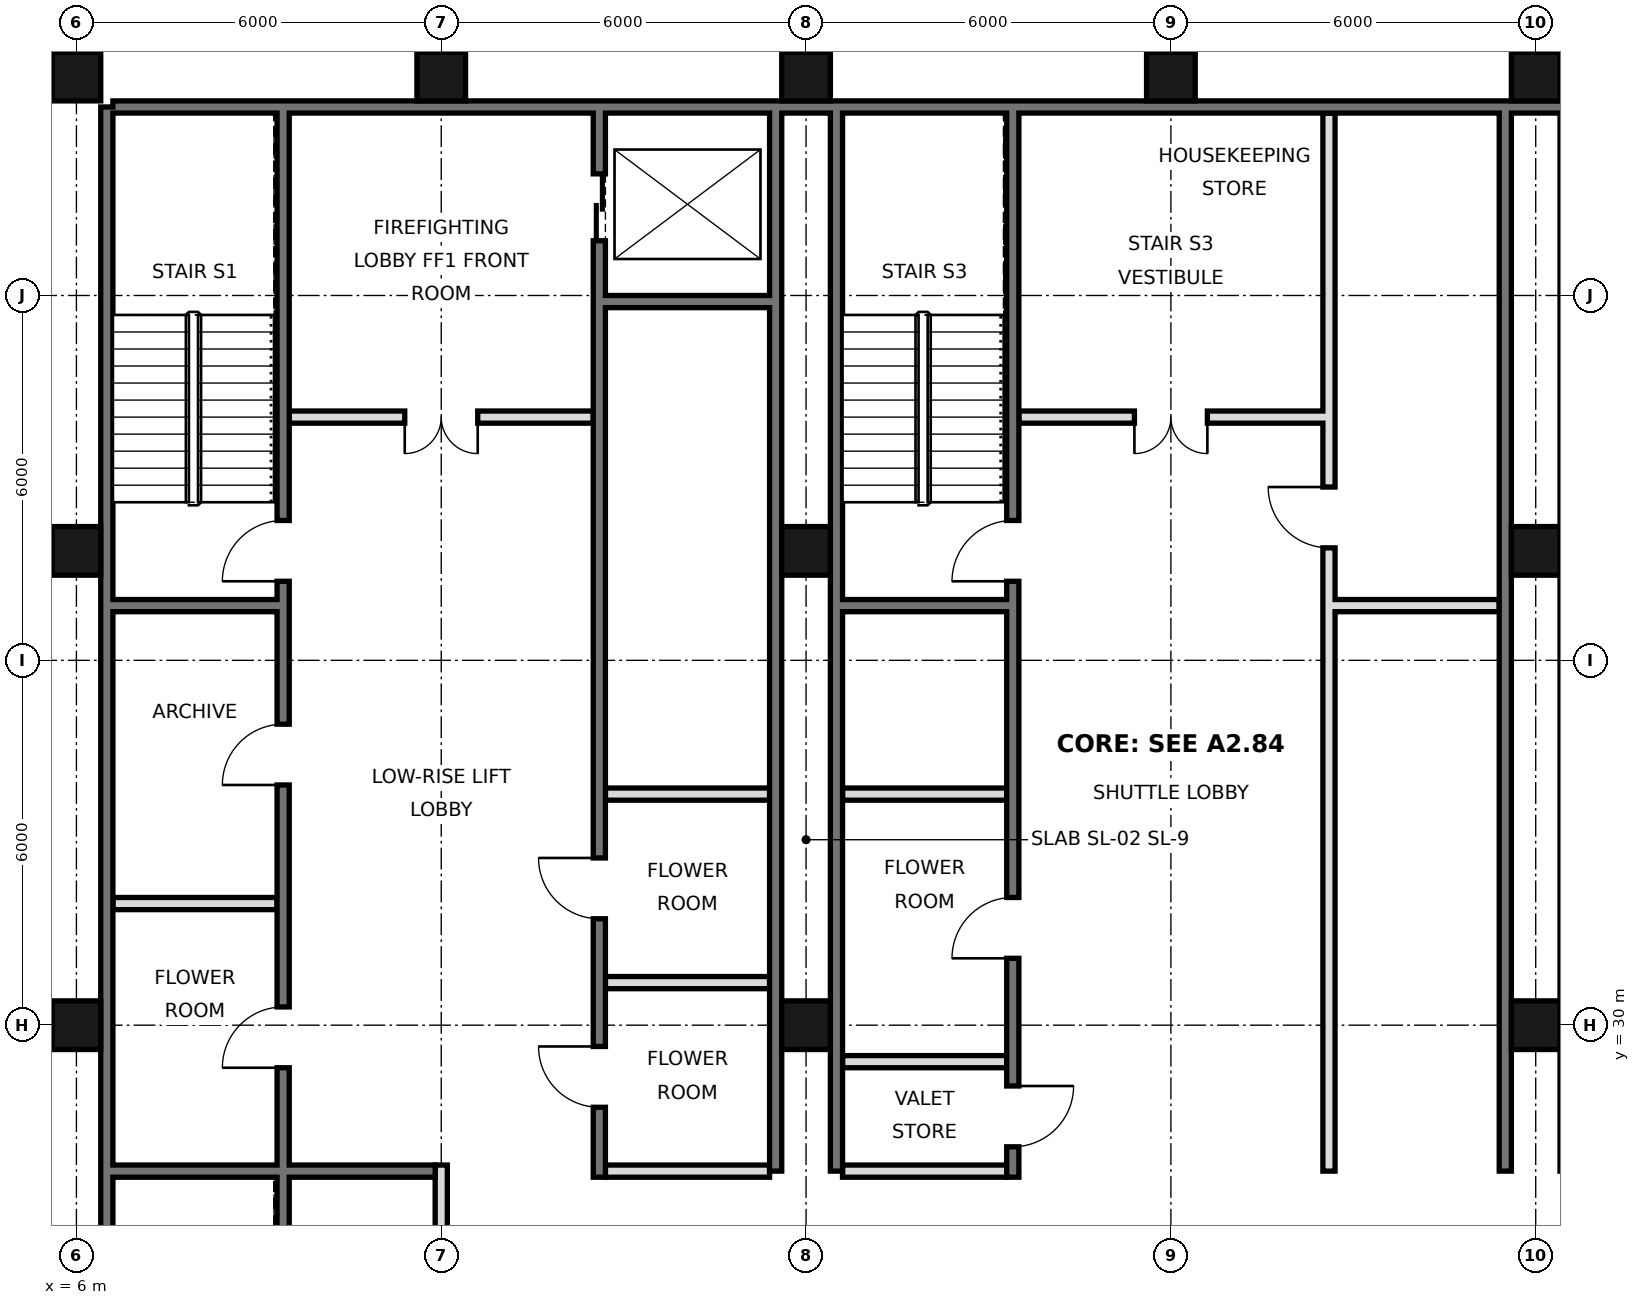
"""IFC4 building model, lengths in metres.
Left out: names, types, materials, properties, quantities, classifications, styles, units other than length and angle.
Written with IfcOpenShell. Run it as: python <this file> out.ifc"""

import sys

from ifc_helpers import new_model, si_unit, direction, frame, frame_2d, origin, origin_2d, place, context, subcontext, project, spatial, rectangle, hollow_rectangle, extrude, element, fill, save


model = new_model("IFC4")
c1 = context("Model", 3, precision=1e-05, world=origin(), true_north=direction((0.0, 1.0)))
c2 = subcontext(c1, "Body", "Model", "MODEL_VIEW")
j1 = project(units=[si_unit("LENGTHUNIT", "METRE"), si_unit("PLANEANGLEUNIT", "RADIAN")], contexts=[c1])
p1 = place(None, origin())
s1 = spatial("IfcSite", under=j1, at=p1, CompositionType="ELEMENT")
p2 = place(p1, origin())
s2 = spatial("IfcBuilding", under=s1, at=p2, CompositionType="ELEMENT")
p3 = place(p2, frame((0.0, 0.0, 337.8)))
s3 = spatial("IfcBuildingStorey", under=s2, at=p3, CompositionType="ELEMENT", Elevation=337.8)
for number, where, z_axis, x_axis in (
    (1, (6.0, 30.0, 0.0), (0.0, 0.0, 1.0), (1.0, 0.0, 0.0)),
    (2, (6.0, 37.8, 0.0), (0.0, 0.0, 1.0), (1.0, 0.0, 0.0)),
    (3, (6.0, 45.6, 0.0), (0.0, 0.0, 1.0), (1.0, 0.0, 0.0)),
    (4, (12.0, 45.6, 0.0), (0.0, 0.0, 1.0), (1.0, 0.0, 0.0)),
    (5, (18.0, 30.0, 0.0), (0.0, 0.0, 1.0), (1.0, 0.0, 0.0)),
    (6, (18.0, 37.8, 0.0), (0.0, 0.0, 1.0), (1.0, 0.0, 0.0)),
    (7, (18.0, 45.6, 0.0), (0.0, 0.0, 1.0), (1.0, 0.0, 0.0)),
    (8, (24.0, 45.6, 0.0), (0.0, 0.0, 1.0), (1.0, 0.0, 0.0)),
    (9, (30.0, 30.0, 0.0), (0.0, 0.0, 1.0), (1.0, 0.0, 0.0)),
    (10, (30.0, 37.8, 0.0), (0.0, 0.0, 1.0), (1.0, 0.0, 0.0)),
    (11, (30.0, 45.6, 0.0), (0.0, 0.0, 1.0), (1.0, 0.0, 0.0)),
):
    element("IfcColumn", number, at=place(p3, frame(where, z_axis=z_axis, x_axis=x_axis)), inside=s3, PredefinedType="COLUMN", context=c2, shape_type="SweptSolid", body=[
        extrude(hollow_rectangle(XDim=0.8, YDim=0.8, WallThickness=0.025, at=origin_2d()), origin(), (0.0, 0.0, 1.0), 4.0),
    ])
p4 = place(p3, frame((6.5, 21.6, 0.0), z_axis=(0.0, 0.0, 1.0), x_axis=(0.0, 1.0, 0.0)))
e12 = element("IfcWall", 12, at=p4, inside=s3, PredefinedType="SOLIDWALL", context=c2, shape_type="SweptSolid", body=[
    extrude(rectangle(XDim=23.5, YDim=0.2, at=frame_2d((11.75, 0.0))), origin(), (0.0, 0.0, 1.0), 3.75),
])
p5 = place(p3, frame((6.6, 45.1, 0.0), z_axis=(0.0, 0.0, 1.0), x_axis=(1.0, 0.0, 0.0)))
e13 = element("IfcWall", 13, at=p5, inside=s3, PredefinedType="SOLIDWALL", context=c2, shape_type="SweptSolid", body=[
    extrude(rectangle(XDim=34.8, YDim=0.2, at=frame_2d((17.4, 0.0))), origin(), (0.0, 0.0, 1.0), 3.75),
])
for number, where, z_axis, x_axis in (
    (14, (17.5, 27.6, 0.0), (0.0, 0.0, 1.0), (0.0, 1.0, 0.0)),
    (15, (18.5, 27.6, 0.0), (0.0, 0.0, 1.0), (0.0, 1.0, 0.0)),
    (16, (29.5, 27.6, 0.0), (0.0, 0.0, 1.0), (0.0, 1.0, 0.0)),
):
    element("IfcWall", number, at=place(p3, frame(where, z_axis=z_axis, x_axis=x_axis)), inside=s3, PredefinedType="SOLIDWALL", context=c2, shape_type="SweptSolid", body=[
        extrude(rectangle(XDim=17.5, YDim=0.2, at=frame_2d((8.75, 0.0))), origin(), (0.0, 0.0, 1.0), 3.75),
    ])
p6 = place(p3, frame((12.0, 21.6, 0.0), z_axis=(0.0, 0.0, 1.0), x_axis=(0.0, 1.0, 0.0)))
e17 = element("IfcWall", 17, at=p6, inside=s3, PredefinedType="PARTITIONING", context=c2, shape_type="SweptSolid", body=[
    extrude(rectangle(XDim=6.1, YDim=0.2, at=frame_2d((3.05, 0.0))), origin(), (0.0, 0.0, 1.0), 3.75),
])
p7 = place(p3, frame((14.6, 27.5, 0.0), z_axis=(0.0, 0.0, 1.0), x_axis=(0.0, 1.0, 0.0)))
e18 = element("IfcWall", 18, at=p7, inside=s3, PredefinedType="SOLIDWALL", context=c2, shape_type="SweptSolid", body=[
    extrude(rectangle(XDim=17.5, YDim=0.2, at=frame_2d((8.75, 0.0))), origin(), (0.0, 0.0, 1.0), 3.75),
])
p8 = place(p7, frame((15.4, 0.0, 0.0)))
e19 = element("IfcOpeningElement", 19, at=p8, cuts=e18, PredefinedType="OPENING", context=c2, shape_type="SweptSolid", body=[
    extrude(rectangle(XDim=1.1, YDim=2.1, at=frame_2d((0.55, 1.05))), frame((0.0, 0.11, 0.0), z_axis=(0.0, -1.0, 0.0), x_axis=(1.0, 0.0, 0.0)), (0.0, 0.0, 1.0), 0.22),
])
p9 = place(p7, frame((1.15, 0.0, 0.0)))
e20 = element("IfcOpeningElement", 20, at=p9, cuts=e18, PredefinedType="OPENING", context=c2, shape_type="SweptSolid", body=[
    extrude(rectangle(XDim=1.0, YDim=2.1, at=frame_2d((0.5, 1.05))), frame((0.0, 0.11, 0.0), z_axis=(0.0, -1.0, 0.0), x_axis=(1.0, 0.0, 0.0)), (0.0, 0.0, 1.0), 0.22),
])
p10 = place(p7, frame((4.25, 0.0, 0.0)))
e21 = element("IfcOpeningElement", 21, at=p10, cuts=e18, PredefinedType="OPENING", context=c2, shape_type="SweptSolid", body=[
    extrude(rectangle(XDim=1.0, YDim=2.1, at=frame_2d((0.5, 1.05))), frame((0.0, 0.11, 0.0), z_axis=(0.0, -1.0, 0.0), x_axis=(1.0, 0.0, 0.0)), (0.0, 0.0, 1.0), 0.22),
])
p11 = place(p3, frame((21.4, 27.5, 0.0), z_axis=(0.0, 0.0, 1.0), x_axis=(0.0, 1.0, 0.0)))
e22 = element("IfcWall", 22, at=p11, inside=s3, PredefinedType="SOLIDWALL", context=c2, shape_type="SweptSolid", body=[
    extrude(rectangle(XDim=17.5, YDim=0.2, at=frame_2d((8.75, 0.0))), origin(), (0.0, 0.0, 1.0), 3.75),
])
p12 = place(p11, frame((0.5, 0.0, 0.0)))
e23 = element("IfcOpeningElement", 23, at=p12, cuts=e22, PredefinedType="OPENING", context=c2, shape_type="SweptSolid", body=[
    extrude(rectangle(XDim=1.0, YDim=2.1, at=frame_2d((0.5, 1.05))), frame((0.0, 0.11, 0.0), z_axis=(0.0, -1.0, 0.0), x_axis=(1.0, 0.0, 0.0)), (0.0, 0.0, 1.0), 0.22),
])
p13 = place(p11, frame((3.6, 0.0, 0.0)))
e24 = element("IfcOpeningElement", 24, at=p13, cuts=e22, PredefinedType="OPENING", context=c2, shape_type="SweptSolid", body=[
    extrude(rectangle(XDim=1.0, YDim=2.1, at=frame_2d((0.5, 1.05))), frame((0.0, 0.11, 0.0), z_axis=(0.0, -1.0, 0.0), x_axis=(1.0, 0.0, 0.0)), (0.0, 0.0, 1.0), 0.22),
])
p14 = place(p11, frame((9.8, 0.0, 0.0)))
e25 = element("IfcOpeningElement", 25, at=p14, cuts=e22, PredefinedType="OPENING", context=c2, shape_type="SweptSolid", body=[
    extrude(rectangle(XDim=1.0, YDim=2.1, at=frame_2d((0.5, 1.05))), frame((0.0, 0.11, 0.0), z_axis=(0.0, -1.0, 0.0), x_axis=(1.0, 0.0, 0.0)), (0.0, 0.0, 1.0), 0.22),
])
p15 = place(p3, frame((26.6, 27.6, 0.0), z_axis=(0.0, 0.0, 1.0), x_axis=(0.0, 1.0, 0.0)))
e26 = element("IfcWall", 26, at=p15, inside=s3, PredefinedType="PARTITIONING", context=c2, shape_type="SweptSolid", body=[
    extrude(rectangle(XDim=17.4, YDim=0.2, at=frame_2d((8.7, 0.0))), origin(), (0.0, 0.0, 1.0), 3.75),
])
p16 = place(p15, frame((10.25, 0.0, 0.0)))
e27 = element("IfcOpeningElement", 27, at=p16, cuts=e26, PredefinedType="OPENING", context=c2, shape_type="SweptSolid", body=[
    extrude(rectangle(XDim=1.0, YDim=2.1, at=frame_2d((0.5, 1.05))), frame((0.0, 0.11, 0.0), z_axis=(0.0, -1.0, 0.0), x_axis=(1.0, 0.0, 0.0)), (0.0, 0.0, 1.0), 0.22),
])
p17 = place(p3, frame((9.4, 21.6, 0.0), z_axis=(0.0, 0.0, 1.0), x_axis=(0.0, 1.0, 0.0)))
e28 = element("IfcWall", 28, at=p17, inside=s3, PredefinedType="SOLIDWALL", context=c2, shape_type="SweptSolid", body=[
    extrude(rectangle(XDim=23.4, YDim=0.2, at=frame_2d((11.7, 0.0))), origin(), (0.0, 0.0, 1.0), 3.75),
])
p18 = place(p17, frame((7.7, 0.0, 0.0)))
e29 = element("IfcOpeningElement", 29, at=p18, cuts=e28, PredefinedType="OPENING", context=c2, shape_type="SweptSolid", body=[
    extrude(rectangle(XDim=1.0, YDim=2.1, at=frame_2d((0.5, 1.05))), frame((0.0, 0.11, 0.0), z_axis=(0.0, -1.0, 0.0), x_axis=(1.0, 0.0, 0.0)), (0.0, 0.0, 1.0), 0.22),
])
p19 = place(p17, frame((12.35, 0.0, 0.0)))
e30 = element("IfcOpeningElement", 30, at=p19, cuts=e28, PredefinedType="OPENING", context=c2, shape_type="SweptSolid", body=[
    extrude(rectangle(XDim=1.0, YDim=2.1, at=frame_2d((0.5, 1.05))), frame((0.0, 0.11, 0.0), z_axis=(0.0, -1.0, 0.0), x_axis=(1.0, 0.0, 0.0)), (0.0, 0.0, 1.0), 0.22),
])
p20 = place(p17, frame((15.7, 0.0, 0.0)))
e31 = element("IfcOpeningElement", 31, at=p20, cuts=e28, PredefinedType="OPENING", context=c2, shape_type="SweptSolid", body=[
    extrude(rectangle(XDim=1.0, YDim=2.1, at=frame_2d((0.5, 1.05))), frame((0.0, 0.11, 0.0), z_axis=(0.0, -1.0, 0.0), x_axis=(1.0, 0.0, 0.0)), (0.0, 0.0, 1.0), 0.22),
])
p21 = place(p17, frame((0.175, 0.0, 0.0)))
e32 = element("IfcOpeningElement", 32, at=p21, cuts=e28, PredefinedType="OPENING", context=c2, shape_type="SweptSolid", body=[
    extrude(rectangle(XDim=0.9, YDim=2.1, at=frame_2d((0.45, 1.05))), frame((0.0, 0.11, 0.0), z_axis=(0.0, -1.0, 0.0), x_axis=(1.0, 0.0, 0.0)), (0.0, 0.0, 1.0), 0.22),
])
for number, where, z_axis, x_axis in (
    (33, (14.7, 27.6, 0.0), (0.0, 0.0, 1.0), (1.0, 0.0, 0.0)),
    (34, (18.6, 27.6, 0.0), (0.0, 0.0, 1.0), (1.0, 0.0, 0.0)),
):
    element("IfcWall", number, at=place(p3, frame(where, z_axis=z_axis, x_axis=x_axis)), inside=s3, PredefinedType="PARTITIONING", context=c2, shape_type="SweptSolid", body=[
        extrude(rectangle(XDim=2.7, YDim=0.2, at=frame_2d((1.35, 0.0))), origin(), (0.0, 0.0, 1.0), 3.75),
    ])
p22 = place(p3, frame((6.6, 27.6, 0.0), z_axis=(0.0, 0.0, 1.0), x_axis=(1.0, 0.0, 0.0)))
e35 = element("IfcWall", 35, at=p22, inside=s3, PredefinedType="SOLIDWALL", context=c2, shape_type="SweptSolid", body=[
    extrude(rectangle(XDim=5.3, YDim=0.2, at=frame_2d((2.65, 0.0))), origin(), (0.0, 0.0, 1.0), 3.75),
])
for number, where, z_axis, x_axis in (
    (36, (18.6, 29.4, 0.0), (0.0, 0.0, 1.0), (1.0, 0.0, 0.0)),
    (37, (14.7, 30.7, 0.0), (0.0, 0.0, 1.0), (1.0, 0.0, 0.0)),
    (38, (6.6, 32.0, 0.0), (0.0, 0.0, 1.0), (1.0, 0.0, 0.0)),
    (39, (14.7, 33.8, 0.0), (0.0, 0.0, 1.0), (1.0, 0.0, 0.0)),
    (40, (18.6, 33.8, 0.0), (0.0, 0.0, 1.0), (1.0, 0.0, 0.0)),
):
    element("IfcWall", number, at=place(p3, frame(where, z_axis=z_axis, x_axis=x_axis)), inside=s3, PredefinedType="PARTITIONING", context=c2, shape_type="SweptSolid", body=[
        extrude(rectangle(XDim=2.7, YDim=0.2, at=frame_2d((1.35, 0.0))), origin(), (0.0, 0.0, 1.0), 3.75),
    ])
p23 = place(p3, frame((18.6, 36.9, 0.0), z_axis=(0.0, 0.0, 1.0), x_axis=(1.0, 0.0, 0.0)))
e41 = element("IfcWall", 41, at=p23, inside=s3, PredefinedType="SOLIDWALL", context=c2, shape_type="SweptSolid", body=[
    extrude(rectangle(XDim=2.7, YDim=0.2, at=frame_2d((1.35, 0.0))), origin(), (0.0, 0.0, 1.0), 3.75),
])
p24 = place(p3, frame((26.7, 36.9, 0.0), z_axis=(0.0, 0.0, 1.0), x_axis=(1.0, 0.0, 0.0)))
e42 = element("IfcWall", 42, at=p24, inside=s3, PredefinedType="PARTITIONING", context=c2, shape_type="SweptSolid", body=[
    extrude(rectangle(XDim=2.7, YDim=0.2, at=frame_2d((1.35, 0.0))), origin(), (0.0, 0.0, 1.0), 3.75),
])
p25 = place(p3, frame((6.6, 36.9, 0.0), z_axis=(0.0, 0.0, 1.0), x_axis=(1.0, 0.0, 0.0)))
e43 = element("IfcWall", 43, at=p25, inside=s3, PredefinedType="SOLIDWALL", context=c2, shape_type="SweptSolid", body=[
    extrude(rectangle(XDim=2.7, YDim=0.2, at=frame_2d((1.35, 0.0))), origin(), (0.0, 0.0, 1.0), 3.75),
])
p26 = place(p3, frame((21.5, 40.0, 0.0), z_axis=(0.0, 0.0, 1.0), x_axis=(1.0, 0.0, 0.0)))
e44 = element("IfcWall", 44, at=p26, inside=s3, PredefinedType="PARTITIONING", context=c2, shape_type="SweptSolid", body=[
    extrude(rectangle(XDim=5.0, YDim=0.2, at=frame_2d((2.5, 0.0))), origin(), (0.0, 0.0, 1.0), 3.75),
])
p27 = place(p26, frame((1.9, 0.0, 0.0)))
e45 = element("IfcOpeningElement", 45, at=p27, cuts=e44, PredefinedType="OPENING", context=c2, shape_type="SweptSolid", body=[
    extrude(rectangle(XDim=1.2, YDim=2.1, at=frame_2d((0.6, 1.05))), frame((0.0, 0.11, 0.0), z_axis=(0.0, -1.0, 0.0), x_axis=(1.0, 0.0, 0.0)), (0.0, 0.0, 1.0), 0.22),
])
p28 = place(p3, frame((9.5, 40.0, 0.0), z_axis=(0.0, 0.0, 1.0), x_axis=(1.0, 0.0, 0.0)))
e46 = element("IfcWall", 46, at=p28, inside=s3, PredefinedType="PARTITIONING", context=c2, shape_type="SweptSolid", body=[
    extrude(rectangle(XDim=5.0, YDim=0.2, at=frame_2d((2.5, 0.0))), origin(), (0.0, 0.0, 1.0), 3.75),
])
p29 = place(p28, frame((1.9, 0.0, 0.0)))
e47 = element("IfcOpeningElement", 47, at=p29, cuts=e46, PredefinedType="OPENING", context=c2, shape_type="SweptSolid", body=[
    extrude(rectangle(XDim=1.2, YDim=2.1, at=frame_2d((0.6, 1.05))), frame((0.0, 0.11, 0.0), z_axis=(0.0, -1.0, 0.0), x_axis=(1.0, 0.0, 0.0)), (0.0, 0.0, 1.0), 0.22),
])
p30 = place(p3, frame((14.7, 41.9, 0.0), z_axis=(0.0, 0.0, 1.0), x_axis=(1.0, 0.0, 0.0)))
e48 = element("IfcWall", 48, at=p30, inside=s3, PredefinedType="SOLIDWALL", context=c2, shape_type="SweptSolid", body=[
    extrude(rectangle(XDim=2.7, YDim=0.2, at=frame_2d((1.35, 0.0))), origin(), (0.0, 0.0, 1.0), 3.75),
])
p31 = place(p29, frame((1.2, 0.0, 0.0), z_axis=(0.0, 0.0, 1.0), x_axis=(-1.0, 0.0, 0.0)))
e49 = element("IfcDoor", 49, at=p31, inside=s3, OperationType="DOUBLE_DOOR_SINGLE_SWING", PredefinedType="DOOR", context=c2, shape_type="SweptSolid", body=[
    extrude(rectangle(XDim=1.2, YDim=2.1, at=frame_2d((0.6, 1.05))), frame((0.0, 0.025, 0.0), z_axis=(0.0, -1.0, 0.0), x_axis=(1.0, 0.0, 0.0)), (0.0, 0.0, 1.0), 0.05),
])
fill(e47, e49)
p32 = place(p27, frame((1.2, 0.0, 0.0), z_axis=(0.0, 0.0, 1.0), x_axis=(-1.0, 0.0, 0.0)))
e50 = element("IfcDoor", 50, at=p32, inside=s3, OperationType="DOUBLE_DOOR_SINGLE_SWING", PredefinedType="DOOR", context=c2, shape_type="SweptSolid", body=[
    extrude(rectangle(XDim=1.2, YDim=2.1, at=frame_2d((0.6, 1.05))), frame((0.0, 0.025, 0.0), z_axis=(0.0, -1.0, 0.0), x_axis=(1.0, 0.0, 0.0)), (0.0, 0.0, 1.0), 0.05),
])
fill(e45, e50)
p33 = place(p8, origin())
e51 = element("IfcDoor", 51, at=p33, inside=s3, OperationType="DOUBLE_DOOR_SLIDING", PredefinedType="DOOR", context=c2, shape_type="SweptSolid", body=[
    extrude(rectangle(XDim=1.1, YDim=2.1, at=frame_2d((0.55, 1.05))), frame((0.0, 0.025, 0.0), z_axis=(0.0, -1.0, 0.0), x_axis=(1.0, 0.0, 0.0)), (0.0, 0.0, 1.0), 0.05),
])
fill(e19, e51)
p34 = place(p12, origin())
e52 = element("IfcDoor", 52, at=p34, inside=s3, OperationType="SINGLE_SWING_RIGHT", PredefinedType="DOOR", context=c2, shape_type="SweptSolid", body=[
    extrude(rectangle(XDim=1.0, YDim=2.1, at=frame_2d((0.5, 1.05))), frame((0.0, 0.025, 0.0), z_axis=(0.0, -1.0, 0.0), x_axis=(1.0, 0.0, 0.0)), (0.0, 0.0, 1.0), 0.05),
])
fill(e23, e52)
p35 = place(p13, origin())
e53 = element("IfcDoor", 53, at=p35, inside=s3, OperationType="SINGLE_SWING_LEFT", PredefinedType="DOOR", context=c2, shape_type="SweptSolid", body=[
    extrude(rectangle(XDim=1.0, YDim=2.1, at=frame_2d((0.5, 1.05))), frame((0.0, 0.025, 0.0), z_axis=(0.0, -1.0, 0.0), x_axis=(1.0, 0.0, 0.0)), (0.0, 0.0, 1.0), 0.05),
])
fill(e24, e53)
p36 = place(p9, frame((1.0, 0.0, 0.0), z_axis=(0.0, 0.0, 1.0), x_axis=(-1.0, 0.0, 0.0)))
e54 = element("IfcDoor", 54, at=p36, inside=s3, OperationType="SINGLE_SWING_LEFT", PredefinedType="DOOR", context=c2, shape_type="SweptSolid", body=[
    extrude(rectangle(XDim=1.0, YDim=2.1, at=frame_2d((0.5, 1.05))), frame((0.0, 0.025, 0.0), z_axis=(0.0, -1.0, 0.0), x_axis=(1.0, 0.0, 0.0)), (0.0, 0.0, 1.0), 0.05),
])
fill(e20, e54)
p37 = place(p10, frame((1.0, 0.0, 0.0), z_axis=(0.0, 0.0, 1.0), x_axis=(-1.0, 0.0, 0.0)))
e55 = element("IfcDoor", 55, at=p37, inside=s3, OperationType="SINGLE_SWING_LEFT", PredefinedType="DOOR", context=c2, shape_type="SweptSolid", body=[
    extrude(rectangle(XDim=1.0, YDim=2.1, at=frame_2d((0.5, 1.05))), frame((0.0, 0.025, 0.0), z_axis=(0.0, -1.0, 0.0), x_axis=(1.0, 0.0, 0.0)), (0.0, 0.0, 1.0), 0.05),
])
fill(e21, e55)
p38 = place(p18, origin())
e56 = element("IfcDoor", 56, at=p38, inside=s3, OperationType="SINGLE_SWING_LEFT", PredefinedType="DOOR", context=c2, shape_type="SweptSolid", body=[
    extrude(rectangle(XDim=1.0, YDim=2.1, at=frame_2d((0.5, 1.05))), frame((0.0, 0.025, 0.0), z_axis=(0.0, -1.0, 0.0), x_axis=(1.0, 0.0, 0.0)), (0.0, 0.0, 1.0), 0.05),
])
fill(e29, e56)
p39 = place(p19, origin())
e57 = element("IfcDoor", 57, at=p39, inside=s3, OperationType="SINGLE_SWING_LEFT", PredefinedType="DOOR", context=c2, shape_type="SweptSolid", body=[
    extrude(rectangle(XDim=1.0, YDim=2.1, at=frame_2d((0.5, 1.05))), frame((0.0, 0.025, 0.0), z_axis=(0.0, -1.0, 0.0), x_axis=(1.0, 0.0, 0.0)), (0.0, 0.0, 1.0), 0.05),
])
fill(e30, e57)
p40 = place(p20, origin())
e58 = element("IfcDoor", 58, at=p40, inside=s3, OperationType="SINGLE_SWING_LEFT", PredefinedType="DOOR", context=c2, shape_type="SweptSolid", body=[
    extrude(rectangle(XDim=1.0, YDim=2.1, at=frame_2d((0.5, 1.05))), frame((0.0, 0.025, 0.0), z_axis=(0.0, -1.0, 0.0), x_axis=(1.0, 0.0, 0.0)), (0.0, 0.0, 1.0), 0.05),
])
fill(e31, e58)
p41 = place(p14, origin())
e59 = element("IfcDoor", 59, at=p41, inside=s3, OperationType="SINGLE_SWING_LEFT", PredefinedType="DOOR", context=c2, shape_type="SweptSolid", body=[
    extrude(rectangle(XDim=1.0, YDim=2.1, at=frame_2d((0.5, 1.05))), frame((0.0, 0.025, 0.0), z_axis=(0.0, -1.0, 0.0), x_axis=(1.0, 0.0, 0.0)), (0.0, 0.0, 1.0), 0.05),
])
fill(e25, e59)
p42 = place(p16, frame((1.0, 0.0, 0.0), z_axis=(0.0, 0.0, 1.0), x_axis=(-1.0, 0.0, 0.0)))
e60 = element("IfcDoor", 60, at=p42, inside=s3, OperationType="SINGLE_SWING_LEFT", PredefinedType="DOOR", context=c2, shape_type="SweptSolid", body=[
    extrude(rectangle(XDim=1.0, YDim=2.1, at=frame_2d((0.5, 1.05))), frame((0.0, 0.025, 0.0), z_axis=(0.0, -1.0, 0.0), x_axis=(1.0, 0.0, 0.0)), (0.0, 0.0, 1.0), 0.05),
])
fill(e27, e60)
save(model, sys.argv[1])
